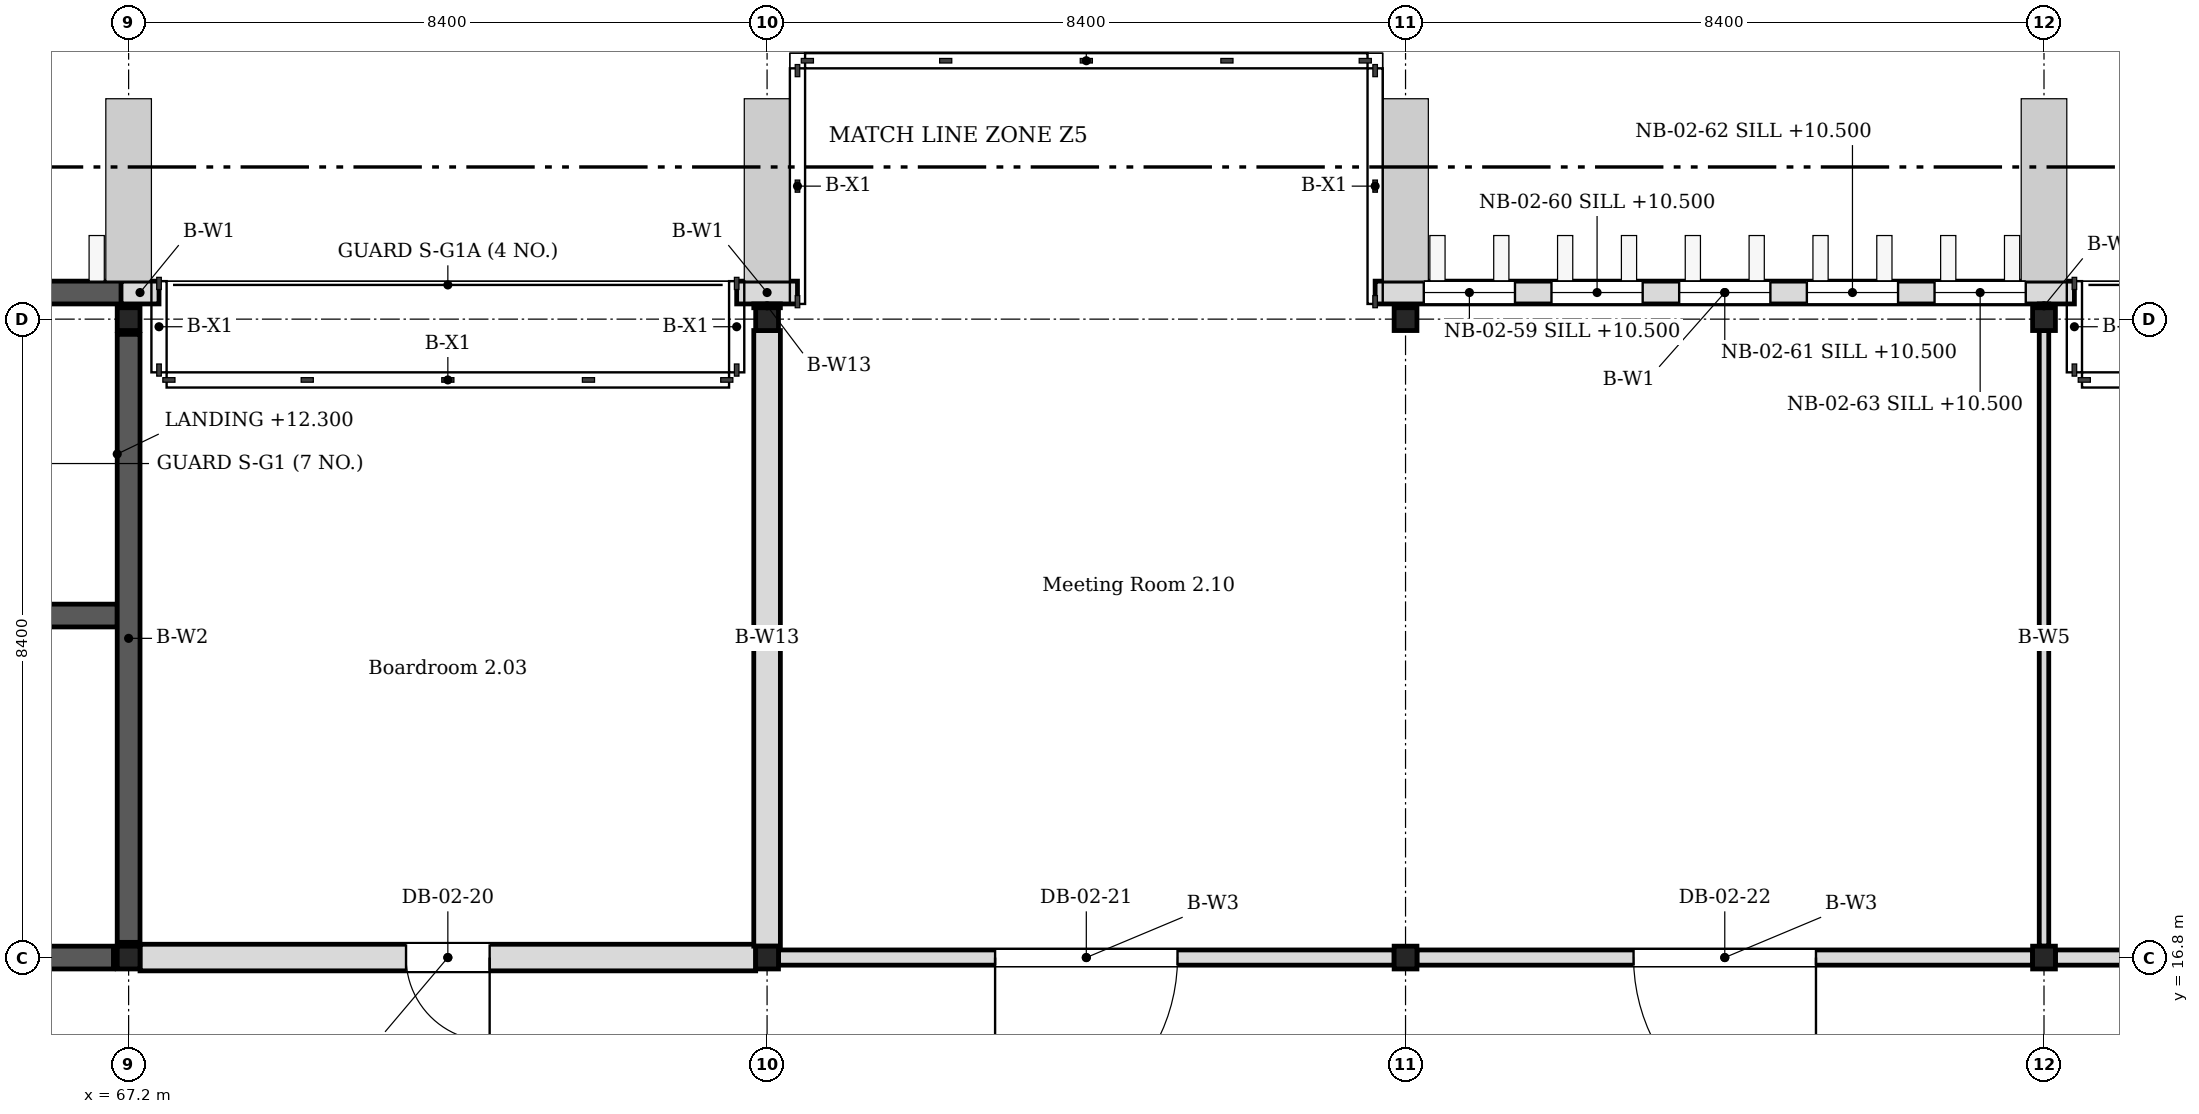
"""IFC4 building model, lengths in metres.
Left out: names, types, materials, properties, quantities, classifications, styles, units other than length and angle.
Written with IfcOpenShell. Run it as: python <this file> out.ifc"""

import sys

from ifc_helpers import new_model, si_unit, direction, frame, frame_2d, origin, origin_2d, place, context, subcontext, project, spatial, rectangle, i_section, extrude, element, fill, save


model = new_model("IFC4")
c1 = context("Model", 3, precision=1e-05, world=origin(), true_north=direction((0.0, 1.0)))
c2 = subcontext(c1, "Body", "Model", "MODEL_VIEW")
j1 = project(units=[si_unit("LENGTHUNIT", "METRE"), si_unit("PLANEANGLEUNIT", "RADIAN")], contexts=[c1])
p1 = place(None, origin())
s1 = spatial("IfcSite", under=j1, at=p1, CompositionType="ELEMENT")
p2 = place(p1, origin())
s2 = spatial("IfcBuilding", under=s1, at=p2, CompositionType="ELEMENT")
p3 = place(p2, frame((0.0, 0.0, 10.2)))
s3 = spatial("IfcBuildingStorey", under=s2, at=p3, CompositionType="ELEMENT", Elevation=10.2)
for number, where, z_axis, x_axis in (
    (1, (67.2, 16.8, 0.0), (0.0, 0.0, 1.0), (1.0, 0.0, 0.0)),
    (2, (67.2, 25.2, 0.0), (0.0, 0.0, 1.0), (1.0, 0.0, 0.0)),
    (3, (75.6, 16.8, 0.0), (0.0, 0.0, 1.0), (1.0, 0.0, 0.0)),
    (4, (75.6, 25.2, 0.0), (0.0, 0.0, 1.0), (1.0, 0.0, 0.0)),
    (5, (84.0, 16.8, 0.0), (0.0, 0.0, 1.0), (1.0, 0.0, 0.0)),
    (6, (84.0, 25.2, 0.0), (0.0, 0.0, 1.0), (1.0, 0.0, 0.0)),
    (7, (92.4, 16.8, 0.0), (0.0, 0.0, 1.0), (1.0, 0.0, 0.0)),
    (8, (92.4, 25.2, 0.0), (0.0, 0.0, 1.0), (1.0, 0.0, 0.0)),
):
    element("IfcColumn", number, at=place(p3, frame(where, z_axis=z_axis, x_axis=x_axis)), inside=s3, PredefinedType="COLUMN", context=c2, shape_type="SweptSolid", body=[
        extrude(i_section(OverallWidth=0.3, OverallDepth=0.3, WebThickness=0.01, FlangeThickness=0.015, FilletRadius=0.013, at=origin_2d()), origin(), (0.0, 0.0, 1.0), 4.2),
    ])
p4 = place(p3, frame((67.2, 17.0, 0.0), z_axis=(0.0, 0.0, 1.0), x_axis=(0.0, 1.0, 0.0)))
e9 = element("IfcWall", 9, at=p4, inside=s3, PredefinedType="SHEAR", context=c2, shape_type="SweptSolid", body=[
    extrude(rectangle(XDim=8.0, YDim=0.3, at=frame_2d((4.0, 0.0))), origin(), (0.0, 0.0, 1.0), 4.05),
])
p5 = place(p3, frame((59.0, 16.8, 0.0), z_axis=(0.0, 0.0, 1.0), x_axis=(1.0, 0.0, 0.0)))
e10 = element("IfcWall", 10, at=p5, inside=s3, PredefinedType="SHEAR", context=c2, shape_type="SweptSolid", body=[
    extrude(rectangle(XDim=8.0, YDim=0.3, at=frame_2d((4.0, 0.0))), origin(), (0.0, 0.0, 1.0), 4.05),
])
p6 = place(p5, frame((3.1, 0.0, 0.0)))
e11 = element("IfcOpeningElement", 11, at=p6, cuts=e10, PredefinedType="OPENING", context=c2, shape_type="SweptSolid", body=[
    extrude(rectangle(XDim=1.8, YDim=2.1, at=frame_2d((0.9, 1.05))), frame((0.0, 0.16, 0.0), z_axis=(0.0, -1.0, 0.0), x_axis=(1.0, 0.0, 0.0)), (0.0, 0.0, 1.0), 0.32),
])
p7 = place(p3, frame((58.95, 21.3, 0.0), z_axis=(0.0, 0.0, 1.0), x_axis=(1.0, 0.0, 0.0)))
e12 = element("IfcWall", 12, at=p7, inside=s3, PredefinedType="SHEAR", context=c2, shape_type="SweptSolid", body=[
    extrude(rectangle(XDim=8.1, YDim=0.3, at=frame_2d((4.05, 0.0))), origin(), (0.0, 0.0, 1.0), 4.05),
])
p8 = place(p7, frame((0.15, 0.0, 0.0)))
e13 = element("IfcOpeningElement", 13, at=p8, cuts=e12, PredefinedType="OPENING", context=c2, shape_type="SweptSolid", body=[
    extrude(rectangle(XDim=1.2, YDim=2.1, at=frame_2d((0.6, 1.05))), frame((0.0, 0.16, 0.0), z_axis=(0.0, -1.0, 0.0), x_axis=(1.0, 0.0, 0.0)), (0.0, 0.0, 1.0), 0.32),
])
p9 = place(p3, frame((58.8, 25.55, 0.0), z_axis=(0.0, 0.0, 1.0), x_axis=(1.0, 0.0, 0.0)))
e14 = element("IfcWall", 14, at=p9, inside=s3, PredefinedType="SHEAR", context=c2, shape_type="SweptSolid", body=[
    extrude(rectangle(XDim=8.4, YDim=0.3, at=frame_2d((4.2, 0.0))), origin(), (0.0, 0.0, 1.0), 4.05),
])
p10 = place(p3, frame((67.1, 25.55, 0.0), z_axis=(0.0, 0.0, 1.0), x_axis=(1.0, 0.0, 0.0)))
e15 = element("IfcWall", 15, at=p10, inside=s3, PredefinedType="SOLIDWALL", context=c2, shape_type="SweptSolid", body=[
    extrude(rectangle(XDim=0.5, YDim=0.3, at=frame_2d((0.25, 0.0))), origin(), (0.0, 0.0, 1.0), 4.05),
])
p11 = place(p3, frame((75.2, 25.55, 0.0), z_axis=(0.0, 0.0, 1.0), x_axis=(1.0, 0.0, 0.0)))
e16 = element("IfcWall", 16, at=p11, inside=s3, PredefinedType="SOLIDWALL", context=c2, shape_type="SweptSolid", body=[
    extrude(rectangle(XDim=0.8, YDim=0.3, at=frame_2d((0.4, 0.0))), origin(), (0.0, 0.0, 1.0), 4.05),
])
p12 = place(p3, frame((83.6, 25.55, 0.0), z_axis=(0.0, 0.0, 1.0), x_axis=(1.0, 0.0, 0.0)))
e17 = element("IfcWall", 17, at=p12, inside=s3, PredefinedType="SOLIDWALL", context=c2, shape_type="SweptSolid", body=[
    extrude(rectangle(XDim=9.2, YDim=0.3, at=frame_2d((4.6, 0.0))), origin(), (0.0, 0.0, 1.0), 4.05),
])
p13 = place(p12, frame((0.64, 0.0, 0.3)))
e18 = element("IfcOpeningElement", 18, at=p13, cuts=e17, PredefinedType="OPENING", context=c2, shape_type="SweptSolid", body=[
    extrude(rectangle(XDim=1.2, YDim=3.3, at=frame_2d((0.6, 1.65))), frame((0.0, 0.16, 0.0), z_axis=(0.0, -1.0, 0.0), x_axis=(1.0, 0.0, 0.0)), (0.0, 0.0, 1.0), 0.32),
])
p14 = place(p12, frame((2.32, 0.0, 0.3)))
e19 = element("IfcOpeningElement", 19, at=p14, cuts=e17, PredefinedType="OPENING", context=c2, shape_type="SweptSolid", body=[
    extrude(rectangle(XDim=1.2, YDim=3.3, at=frame_2d((0.6, 1.65))), frame((0.0, 0.16, 0.0), z_axis=(0.0, -1.0, 0.0), x_axis=(1.0, 0.0, 0.0)), (0.0, 0.0, 1.0), 0.32),
])
p15 = place(p12, frame((4.0, 0.0, 0.3)))
e20 = element("IfcOpeningElement", 20, at=p15, cuts=e17, PredefinedType="OPENING", context=c2, shape_type="SweptSolid", body=[
    extrude(rectangle(XDim=1.2, YDim=3.3, at=frame_2d((0.6, 1.65))), frame((0.0, 0.16, 0.0), z_axis=(0.0, -1.0, 0.0), x_axis=(1.0, 0.0, 0.0)), (0.0, 0.0, 1.0), 0.32),
])
p16 = place(p12, frame((5.68, 0.0, 0.3)))
e21 = element("IfcOpeningElement", 21, at=p16, cuts=e17, PredefinedType="OPENING", context=c2, shape_type="SweptSolid", body=[
    extrude(rectangle(XDim=1.2, YDim=3.3, at=frame_2d((0.6, 1.65))), frame((0.0, 0.16, 0.0), z_axis=(0.0, -1.0, 0.0), x_axis=(1.0, 0.0, 0.0)), (0.0, 0.0, 1.0), 0.32),
])
p17 = place(p12, frame((7.36, 0.0, 0.3)))
e22 = element("IfcOpeningElement", 22, at=p17, cuts=e17, PredefinedType="OPENING", context=c2, shape_type="SweptSolid", body=[
    extrude(rectangle(XDim=1.2, YDim=3.3, at=frame_2d((0.6, 1.65))), frame((0.0, 0.16, 0.0), z_axis=(0.0, -1.0, 0.0), x_axis=(1.0, 0.0, 0.0)), (0.0, 0.0, 1.0), 0.32),
])
p18 = place(p3, frame((67.35, 16.8, 0.0), z_axis=(0.0, 0.0, 1.0), x_axis=(1.0, 0.0, 0.0)))
e23 = element("IfcWall", 23, at=p18, inside=s3, PredefinedType="PARTITIONING", context=c2, shape_type="SweptSolid", body=[
    extrude(rectangle(XDim=8.1, YDim=0.35, at=frame_2d((4.05, 0.0))), origin(), (0.0, 0.0, 1.0), 3.35),
])
p19 = place(p18, frame((3.5, 0.0, 0.0)))
e24 = element("IfcOpeningElement", 24, at=p19, cuts=e23, PredefinedType="OPENING", context=c2, shape_type="SweptSolid", body=[
    extrude(rectangle(XDim=1.1, YDim=2.4, at=frame_2d((0.55, 1.2))), frame((0.0, 0.185, 0.0), z_axis=(0.0, -1.0, 0.0), x_axis=(1.0, 0.0, 0.0)), (0.0, 0.0, 1.0), 0.37),
])
p20 = place(p3, frame((75.75, 16.8, 0.0), z_axis=(0.0, 0.0, 1.0), x_axis=(1.0, 0.0, 0.0)))
e25 = element("IfcWall", 25, at=p20, inside=s3, PredefinedType="PARTITIONING", context=c2, shape_type="SweptSolid", body=[
    extrude(rectangle(XDim=8.1, YDim=0.2, at=frame_2d((4.05, 0.0))), origin(), (0.0, 0.0, 1.0), 3.35),
])
p21 = place(p20, frame((2.85, 0.0, 0.0)))
e26 = element("IfcOpeningElement", 26, at=p21, cuts=e25, PredefinedType="OPENING", context=c2, shape_type="SweptSolid", body=[
    extrude(rectangle(XDim=2.4, YDim=2.2, at=frame_2d((1.2, 1.1))), frame((0.0, 0.11, 0.0), z_axis=(0.0, -1.0, 0.0), x_axis=(1.0, 0.0, 0.0)), (0.0, 0.0, 1.0), 0.22),
])
p22 = place(p3, frame((84.15, 16.8, 0.0), z_axis=(0.0, 0.0, 1.0), x_axis=(1.0, 0.0, 0.0)))
e27 = element("IfcWall", 27, at=p22, inside=s3, PredefinedType="PARTITIONING", context=c2, shape_type="SweptSolid", body=[
    extrude(rectangle(XDim=8.1, YDim=0.2, at=frame_2d((4.05, 0.0))), origin(), (0.0, 0.0, 1.0), 3.35),
])
p23 = place(p22, frame((2.85, 0.0, 0.0)))
e28 = element("IfcOpeningElement", 28, at=p23, cuts=e27, PredefinedType="OPENING", context=c2, shape_type="SweptSolid", body=[
    extrude(rectangle(XDim=2.4, YDim=2.2, at=frame_2d((1.2, 1.1))), frame((0.0, 0.11, 0.0), z_axis=(0.0, -1.0, 0.0), x_axis=(1.0, 0.0, 0.0)), (0.0, 0.0, 1.0), 0.22),
])
p24 = place(p3, frame((92.55, 16.8, 0.0), z_axis=(0.0, 0.0, 1.0), x_axis=(1.0, 0.0, 0.0)))
e29 = element("IfcWall", 29, at=p24, inside=s3, PredefinedType="PARTITIONING", context=c2, shape_type="SweptSolid", body=[
    extrude(rectangle(XDim=8.1, YDim=0.2, at=frame_2d((4.05, 0.0))), origin(), (0.0, 0.0, 1.0), 3.35),
])
p25 = place(p24, frame((3.15, 0.0, 0.0)))
e30 = element("IfcOpeningElement", 30, at=p25, cuts=e29, PredefinedType="OPENING", context=c2, shape_type="SweptSolid", body=[
    extrude(rectangle(XDim=1.8, YDim=2.1, at=frame_2d((0.9, 1.05))), frame((0.0, 0.11, 0.0), z_axis=(0.0, -1.0, 0.0), x_axis=(1.0, 0.0, 0.0)), (0.0, 0.0, 1.0), 0.22),
])
p26 = place(p3, frame((75.6, 16.95, 0.0), z_axis=(0.0, 0.0, 1.0), x_axis=(0.0, 1.0, 0.0)))
e31 = element("IfcWall", 31, at=p26, inside=s3, PredefinedType="PARTITIONING", context=c2, shape_type="SweptSolid", body=[
    extrude(rectangle(XDim=8.1, YDim=0.35, at=frame_2d((4.05, 0.0))), origin(), (0.0, 0.0, 1.0), 3.35),
])
p27 = place(p3, frame((75.6, 25.35, 0.0), z_axis=(0.0, 0.0, 1.0), x_axis=(0.0, 1.0, 0.0)))
e32 = element("IfcWall", 32, at=p27, inside=s3, PredefinedType="PARTITIONING", context=c2, shape_type="SweptSolid", body=[
    extrude(rectangle(XDim=0.05, YDim=0.35, at=frame_2d((0.025, 0.0))), origin(), (0.0, 0.0, 1.0), 3.35),
])
p28 = place(p3, frame((92.4, 16.95, 0.0), z_axis=(0.0, 0.0, 1.0), x_axis=(0.0, 1.0, 0.0)))
e33 = element("IfcWall", 33, at=p28, inside=s3, PredefinedType="MOVABLE", context=c2, shape_type="SweptSolid", body=[
    extrude(rectangle(XDim=8.1, YDim=0.125, at=frame_2d((4.05, 0.0))), origin(), (0.0, 0.0, 1.0), 3.35),
])
p29 = place(p3, frame((92.4, 25.35, 0.0), z_axis=(0.0, 0.0, 1.0), x_axis=(0.0, 1.0, 0.0)))
e34 = element("IfcWall", 34, at=p29, inside=s3, PredefinedType="MOVABLE", context=c2, shape_type="SweptSolid", body=[
    extrude(rectangle(XDim=0.05, YDim=0.125, at=frame_2d((0.025, 0.0))), origin(), (0.0, 0.0, 1.0), 3.35),
])
p30 = place(p13, origin())
e35 = element("IfcWindow", 35, at=p30, inside=s3, PartitioningType="TRIPLE_PANEL_VERTICAL", PredefinedType="WINDOW", context=c2, shape_type="SweptSolid", body=[
    extrude(rectangle(XDim=1.2, YDim=3.3, at=frame_2d((0.6, 1.65))), frame((0.0, 0.03, 0.0), z_axis=(0.0, -1.0, 0.0), x_axis=(1.0, 0.0, 0.0)), (0.0, 0.0, 1.0), 0.06),
])
fill(e18, e35)
p31 = place(p14, origin())
e36 = element("IfcWindow", 36, at=p31, inside=s3, PartitioningType="TRIPLE_PANEL_VERTICAL", PredefinedType="WINDOW", context=c2, shape_type="SweptSolid", body=[
    extrude(rectangle(XDim=1.2, YDim=3.3, at=frame_2d((0.6, 1.65))), frame((0.0, 0.03, 0.0), z_axis=(0.0, -1.0, 0.0), x_axis=(1.0, 0.0, 0.0)), (0.0, 0.0, 1.0), 0.06),
])
fill(e19, e36)
p32 = place(p15, origin())
e37 = element("IfcWindow", 37, at=p32, inside=s3, PartitioningType="TRIPLE_PANEL_VERTICAL", PredefinedType="WINDOW", context=c2, shape_type="SweptSolid", body=[
    extrude(rectangle(XDim=1.2, YDim=3.3, at=frame_2d((0.6, 1.65))), frame((0.0, 0.03, 0.0), z_axis=(0.0, -1.0, 0.0), x_axis=(1.0, 0.0, 0.0)), (0.0, 0.0, 1.0), 0.06),
])
fill(e20, e37)
p33 = place(p16, origin())
e38 = element("IfcWindow", 38, at=p33, inside=s3, PartitioningType="TRIPLE_PANEL_VERTICAL", PredefinedType="WINDOW", context=c2, shape_type="SweptSolid", body=[
    extrude(rectangle(XDim=1.2, YDim=3.3, at=frame_2d((0.6, 1.65))), frame((0.0, 0.03, 0.0), z_axis=(0.0, -1.0, 0.0), x_axis=(1.0, 0.0, 0.0)), (0.0, 0.0, 1.0), 0.06),
])
fill(e21, e38)
p34 = place(p17, origin())
e39 = element("IfcWindow", 39, at=p34, inside=s3, PartitioningType="TRIPLE_PANEL_VERTICAL", PredefinedType="WINDOW", context=c2, shape_type="SweptSolid", body=[
    extrude(rectangle(XDim=1.2, YDim=3.3, at=frame_2d((0.6, 1.65))), frame((0.0, 0.03, 0.0), z_axis=(0.0, -1.0, 0.0), x_axis=(1.0, 0.0, 0.0)), (0.0, 0.0, 1.0), 0.06),
])
fill(e22, e39)
p35 = place(p19, origin())
e40 = element("IfcDoor", 40, at=p35, inside=s3, OperationType="SINGLE_SWING_LEFT", PredefinedType="DOOR", context=c2, shape_type="SweptSolid", body=[
    extrude(rectangle(XDim=1.1, YDim=2.4, at=frame_2d((0.55, 1.2))), frame((0.0, 0.025, 0.0), z_axis=(0.0, -1.0, 0.0), x_axis=(1.0, 0.0, 0.0)), (0.0, 0.0, 1.0), 0.05),
])
fill(e24, e40)
p36 = place(p21, origin())
e41 = element("IfcDoor", 41, at=p36, inside=s3, OperationType="DOUBLE_DOOR_SINGLE_SWING", PredefinedType="DOOR", context=c2, shape_type="SweptSolid", body=[
    extrude(rectangle(XDim=2.4, YDim=2.2, at=frame_2d((1.2, 1.1))), frame((0.0, 0.025, 0.0), z_axis=(0.0, -1.0, 0.0), x_axis=(1.0, 0.0, 0.0)), (0.0, 0.0, 1.0), 0.05),
])
fill(e26, e41)
p37 = place(p23, origin())
e42 = element("IfcDoor", 42, at=p37, inside=s3, OperationType="DOUBLE_DOOR_SINGLE_SWING", PredefinedType="DOOR", context=c2, shape_type="SweptSolid", body=[
    extrude(rectangle(XDim=2.4, YDim=2.2, at=frame_2d((1.2, 1.1))), frame((0.0, 0.025, 0.0), z_axis=(0.0, -1.0, 0.0), x_axis=(1.0, 0.0, 0.0)), (0.0, 0.0, 1.0), 0.05),
])
fill(e28, e42)
save(model, sys.argv[1])
